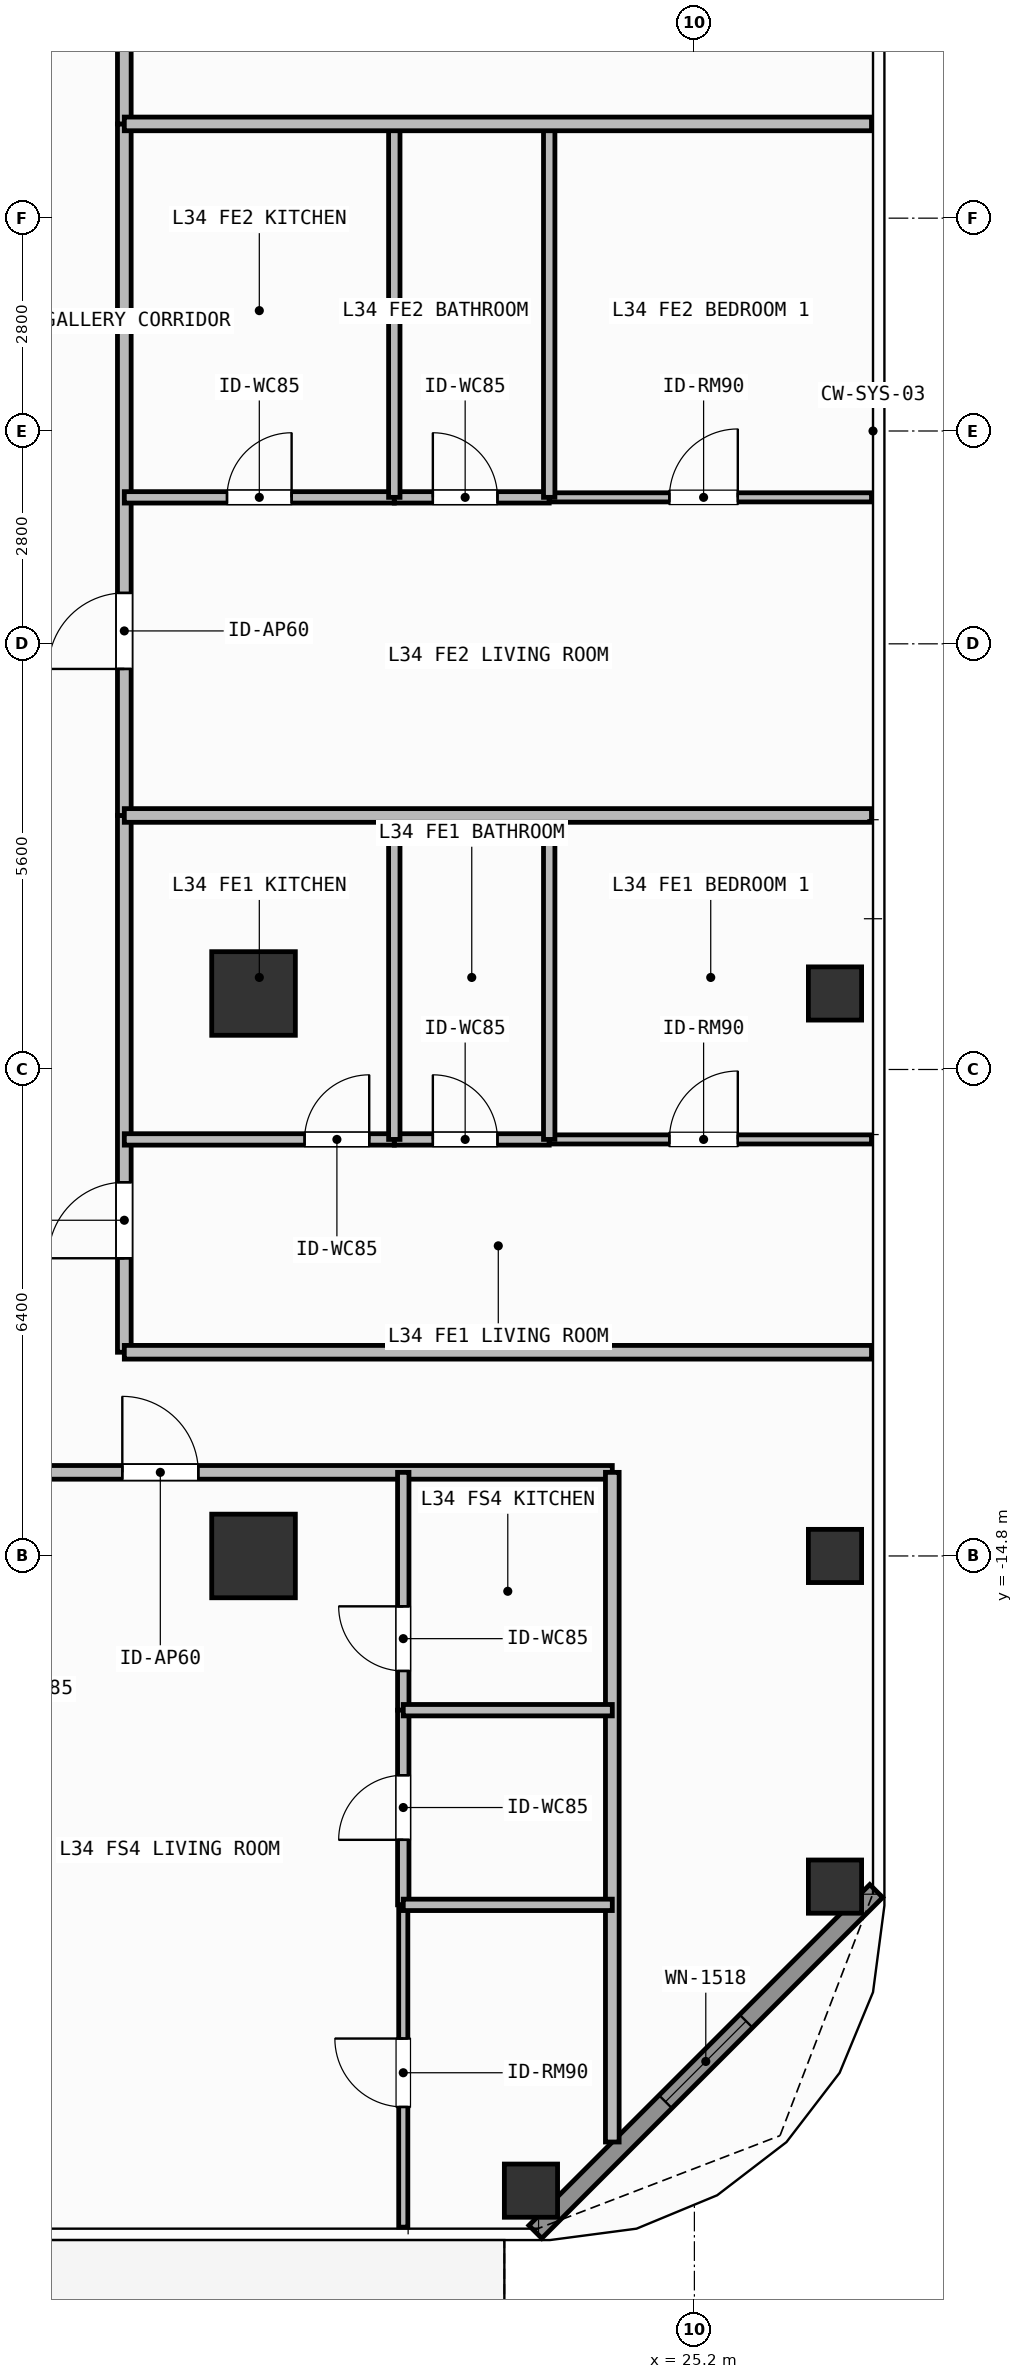
"""IFC4 building model, lengths in metres.
Left out: names, types, materials, properties, quantities, classifications, styles, units other than length and angle.
Written with IfcOpenShell. Run it as: python <this file> out.ifc"""

import sys

from ifc_helpers import new_model, si_unit, direction, frame, frame_2d, origin, origin_2d, place, context, subcontext, project, spatial, rectangle, hollow_rectangle, extrude, element, fill, save


model = new_model("IFC4")
c1 = context("Model", 3, precision=1e-05, world=origin(), true_north=direction((0.0, 1.0)))
c2 = subcontext(c1, "Body", "Model", "MODEL_VIEW")
j1 = project(units=[si_unit("LENGTHUNIT", "METRE"), si_unit("PLANEANGLEUNIT", "RADIAN")], contexts=[c1])
p1 = place(None, origin())
s1 = spatial("IfcSite", under=j1, at=p1, CompositionType="ELEMENT")
p2 = place(p1, origin())
s2 = spatial("IfcBuilding", under=s1, at=p2, CompositionType="ELEMENT")
p3 = place(p2, frame((0.0, 0.0, 136.8)))
s3 = spatial("IfcBuildingStorey", under=s2, at=p3, CompositionType="ELEMENT", Elevation=136.8)
for number, where, z_axis, x_axis in (
    (1, (19.4, -14.8, 0.0), (0.0, 0.0, 1.0), (1.0, 0.0, 0.0)),
    (2, (19.4, -7.4, 0.0), (0.0, 0.0, 1.0), (1.0, 0.0, 0.0)),
):
    element("IfcColumn", number, at=place(p3, frame(where, z_axis=z_axis, x_axis=x_axis)), inside=s3, PredefinedType="COLUMN", context=c2, shape_type="SweptSolid", body=[
        extrude(rectangle(XDim=1.1, YDim=1.1, at=origin_2d()), origin(), (0.0, 0.0, 1.0), 3.9),
    ])
for number, where, z_axis, x_axis in (
    (3, (23.05, -23.15, 0.0), (0.0, 0.0, 1.0), (1.0, 0.0, 0.0)),
    (4, (27.05, -19.15, 0.0), (0.0, 0.0, 1.0), (1.0, 0.0, 0.0)),
    (5, (27.05, -14.8, 0.0), (0.0, 0.0, 1.0), (1.0, 0.0, 0.0)),
    (6, (27.05, -7.4, 0.0), (0.0, 0.0, 1.0), (1.0, 0.0, 0.0)),
):
    element("IfcColumn", number, at=place(p3, frame(where, z_axis=z_axis, x_axis=x_axis)), inside=s3, PredefinedType="COLUMN", context=c2, shape_type="SweptSolid", body=[
        extrude(hollow_rectangle(XDim=0.7, YDim=0.7, WallThickness=0.032, at=origin_2d()), origin(), (0.0, 0.0, 1.0), 3.9),
    ])
p4 = place(p3, frame((27.592, -19.208, 0.0), z_axis=(0.0, 0.0, 1.0), x_axis=(-0.707087534163, -0.707126027686, 0.0)))
e7 = element("IfcWall", 7, at=p4, inside=s3, PredefinedType="SOLIDWALL", context=c2, shape_type="SweptSolid", body=[
    extrude(rectangle(XDim=6.342, YDim=0.24, at=frame_2d((3.171, 0.0))), origin(), (0.0, 0.0, 1.0), 3.68),
])
p5 = place(p4, frame((2.421, 0.0, 0.8)))
e8 = element("IfcOpeningElement", 8, at=p5, cuts=e7, PredefinedType="OPENING", context=c2, shape_type="SweptSolid", body=[
    extrude(rectangle(XDim=1.5, YDim=1.85, at=frame_2d((0.75, 0.925))), frame((0.0, 0.13, 0.0), z_axis=(0.0, -1.0, 0.0), x_axis=(1.0, 0.0, 0.0)), (0.0, 0.0, 1.0), 0.26),
])
p6 = place(p3, frame((15.223, -13.7, 0.0), z_axis=(0.0, 0.0, 1.0), x_axis=(1.0, 0.0, 0.0)))
e9 = element("IfcWall", 9, at=p6, inside=s3, PredefinedType="PARTITIONING", context=c2, shape_type="SweptSolid", body=[
    extrude(rectangle(XDim=8.897, YDim=0.18, at=frame_2d((4.449, 0.0))), origin(), (0.0, 0.0, 1.0), 3.68),
])
p7 = place(p6, frame((2.451, 0.0, 0.0)))
e10 = element("IfcOpeningElement", 10, at=p7, cuts=e9, PredefinedType="OPENING", context=c2, shape_type="SweptSolid", body=[
    extrude(rectangle(XDim=1.0, YDim=2.2, at=frame_2d((0.5, 1.1))), frame((0.0, 0.1, 0.0), z_axis=(0.0, -1.0, 0.0), x_axis=(1.0, 0.0, 0.0)), (0.0, 0.0, 1.0), 0.2),
])
p8 = place(p3, frame((21.37, -16.829, 0.0), z_axis=(0.0, 0.0, 1.0), x_axis=(0.0, 1.0, 0.0)))
e11 = element("IfcWall", 11, at=p8, inside=s3, PredefinedType="PARTITIONING", context=c2, shape_type="SweptSolid", body=[
    extrude(rectangle(XDim=3.129, YDim=0.15, at=frame_2d((1.564, 0.0))), origin(), (0.0, 0.0, 1.0), 3.68),
])
p9 = place(p8, frame((0.516, 0.0, 0.0)))
e12 = element("IfcOpeningElement", 12, at=p9, cuts=e11, PredefinedType="OPENING", context=c2, shape_type="SweptSolid", body=[
    extrude(rectangle(XDim=0.85, YDim=2.1, at=frame_2d((0.425, 1.05))), frame((0.0, 0.085, 0.0), z_axis=(0.0, -1.0, 0.0), x_axis=(1.0, 0.0, 0.0)), (0.0, 0.0, 1.0), 0.17),
])
p10 = place(p3, frame((21.37, -19.39, 0.0), z_axis=(0.0, 0.0, 1.0), x_axis=(0.0, 1.0, 0.0)))
e13 = element("IfcWall", 13, at=p10, inside=s3, PredefinedType="PARTITIONING", context=c2, shape_type="SweptSolid", body=[
    extrude(rectangle(XDim=2.561, YDim=0.15, at=frame_2d((1.28, 0.0))), origin(), (0.0, 0.0, 1.0), 3.68),
])
p11 = place(p10, frame((0.855, 0.0, 0.0)))
e14 = element("IfcOpeningElement", 14, at=p11, cuts=e13, PredefinedType="OPENING", context=c2, shape_type="SweptSolid", body=[
    extrude(rectangle(XDim=0.85, YDim=2.1, at=frame_2d((0.425, 1.05))), frame((0.0, 0.085, 0.0), z_axis=(0.0, -1.0, 0.0), x_axis=(1.0, 0.0, 0.0)), (0.0, 0.0, 1.0), 0.17),
])
p12 = place(p3, frame((21.37, -23.63, 0.0), z_axis=(0.0, 0.0, 1.0), x_axis=(0.0, 1.0, 0.0)))
e15 = element("IfcWall", 15, at=p12, inside=s3, PredefinedType="PARTITIONING", context=c2, shape_type="SweptSolid", body=[
    extrude(rectangle(XDim=4.24, YDim=0.12, at=frame_2d((2.12, 0.0))), origin(), (0.0, 0.0, 1.0), 3.68),
])
p13 = place(p12, frame((1.581, 0.0, 0.0)))
e16 = element("IfcOpeningElement", 16, at=p13, cuts=e15, PredefinedType="OPENING", context=c2, shape_type="SweptSolid", body=[
    extrude(rectangle(XDim=0.9, YDim=2.1, at=frame_2d((0.45, 1.05))), frame((0.0, 0.07, 0.0), z_axis=(0.0, -1.0, 0.0), x_axis=(1.0, 0.0, 0.0)), (0.0, 0.0, 1.0), 0.14),
])
p14 = place(p3, frame((17.7, -12.12, 0.0), z_axis=(0.0, 0.0, 1.0), x_axis=(0.0, 1.0, 0.0)))
e17 = element("IfcWall", 17, at=p14, inside=s3, PredefinedType="PARTITIONING", context=c2, shape_type="SweptSolid", body=[
    extrude(rectangle(XDim=7.062, YDim=0.18, at=frame_2d((3.531, 0.0))), origin(), (0.0, 0.0, 1.0), 3.68),
])
p15 = place(p14, frame((1.237, 0.0, 0.0)))
e18 = element("IfcOpeningElement", 18, at=p15, cuts=e17, PredefinedType="OPENING", context=c2, shape_type="SweptSolid", body=[
    extrude(rectangle(XDim=1.0, YDim=2.2, at=frame_2d((0.5, 1.1))), frame((0.0, 0.1, 0.0), z_axis=(0.0, -1.0, 0.0), x_axis=(1.0, 0.0, 0.0)), (0.0, 0.0, 1.0), 0.2),
])
p16 = place(p3, frame((17.7, -9.32, 0.0), z_axis=(0.0, 0.0, 1.0), x_axis=(1.0, 0.0, 0.0)))
e19 = element("IfcWall", 19, at=p16, inside=s3, PredefinedType="PARTITIONING", context=c2, shape_type="SweptSolid", body=[
    extrude(rectangle(XDim=3.552, YDim=0.15, at=frame_2d((1.776, 0.0))), origin(), (0.0, 0.0, 1.0), 3.68),
])
p17 = place(p16, frame((2.372, 0.0, 0.0)))
e20 = element("IfcOpeningElement", 20, at=p17, cuts=e19, PredefinedType="OPENING", context=c2, shape_type="SweptSolid", body=[
    extrude(rectangle(XDim=0.85, YDim=2.1, at=frame_2d((0.425, 1.05))), frame((0.0, 0.085, 0.0), z_axis=(0.0, -1.0, 0.0), x_axis=(1.0, 0.0, 0.0)), (0.0, 0.0, 1.0), 0.17),
])
p18 = place(p3, frame((21.252, -9.32, 0.0), z_axis=(0.0, 0.0, 1.0), x_axis=(1.0, 0.0, 0.0)))
e21 = element("IfcWall", 21, at=p18, inside=s3, PredefinedType="PARTITIONING", context=c2, shape_type="SweptSolid", body=[
    extrude(rectangle(XDim=2.038, YDim=0.15, at=frame_2d((1.019, 0.0))), origin(), (0.0, 0.0, 1.0), 3.68),
])
p19 = place(p18, frame((0.507, 0.0, 0.0)))
e22 = element("IfcOpeningElement", 22, at=p19, cuts=e21, PredefinedType="OPENING", context=c2, shape_type="SweptSolid", body=[
    extrude(rectangle(XDim=0.85, YDim=2.1, at=frame_2d((0.425, 1.05))), frame((0.0, 0.085, 0.0), z_axis=(0.0, -1.0, 0.0), x_axis=(1.0, 0.0, 0.0)), (0.0, 0.0, 1.0), 0.17),
])
p20 = place(p3, frame((23.29, -9.32, 0.0), z_axis=(0.0, 0.0, 1.0), x_axis=(1.0, 0.0, 0.0)))
e23 = element("IfcWall", 23, at=p20, inside=s3, PredefinedType="PARTITIONING", context=c2, shape_type="SweptSolid", body=[
    extrude(rectangle(XDim=4.24, YDim=0.12, at=frame_2d((2.12, 0.0))), origin(), (0.0, 0.0, 1.0), 3.68),
])
p21 = place(p20, frame((1.581, 0.0, 0.0)))
e24 = element("IfcOpeningElement", 24, at=p21, cuts=e23, PredefinedType="OPENING", context=c2, shape_type="SweptSolid", body=[
    extrude(rectangle(XDim=0.9, YDim=2.1, at=frame_2d((0.45, 1.05))), frame((0.0, 0.07, 0.0), z_axis=(0.0, -1.0, 0.0), x_axis=(1.0, 0.0, 0.0)), (0.0, 0.0, 1.0), 0.14),
])
p22 = place(p3, frame((17.7, -5.058, 0.0), z_axis=(0.0, 0.0, 1.0), x_axis=(0.0, 1.0, 0.0)))
e25 = element("IfcWall", 25, at=p22, inside=s3, PredefinedType="PARTITIONING", context=c2, shape_type="SweptSolid", body=[
    extrude(rectangle(XDim=9.098, YDim=0.18, at=frame_2d((4.549, 0.0))), origin(), (0.0, 0.0, 1.0), 3.68),
])
p23 = place(p22, frame((1.928, 0.0, 0.0)))
e26 = element("IfcOpeningElement", 26, at=p23, cuts=e25, PredefinedType="OPENING", context=c2, shape_type="SweptSolid", body=[
    extrude(rectangle(XDim=1.0, YDim=2.2, at=frame_2d((0.5, 1.1))), frame((0.0, 0.1, 0.0), z_axis=(0.0, -1.0, 0.0), x_axis=(1.0, 0.0, 0.0)), (0.0, 0.0, 1.0), 0.2),
])
p24 = place(p3, frame((17.7, -0.873, 0.0), z_axis=(0.0, 0.0, 1.0), x_axis=(1.0, 0.0, 0.0)))
e27 = element("IfcWall", 27, at=p24, inside=s3, PredefinedType="PARTITIONING", context=c2, shape_type="SweptSolid", body=[
    extrude(rectangle(XDim=3.552, YDim=0.15, at=frame_2d((1.776, 0.0))), origin(), (0.0, 0.0, 1.0), 3.68),
])
p25 = place(p24, frame((1.351, 0.0, 0.0)))
e28 = element("IfcOpeningElement", 28, at=p25, cuts=e27, PredefinedType="OPENING", context=c2, shape_type="SweptSolid", body=[
    extrude(rectangle(XDim=0.85, YDim=2.1, at=frame_2d((0.425, 1.05))), frame((0.0, 0.085, 0.0), z_axis=(0.0, -1.0, 0.0), x_axis=(1.0, 0.0, 0.0)), (0.0, 0.0, 1.0), 0.17),
])
p26 = place(p3, frame((21.252, -0.873, 0.0), z_axis=(0.0, 0.0, 1.0), x_axis=(1.0, 0.0, 0.0)))
e29 = element("IfcWall", 29, at=p26, inside=s3, PredefinedType="PARTITIONING", context=c2, shape_type="SweptSolid", body=[
    extrude(rectangle(XDim=2.038, YDim=0.15, at=frame_2d((1.019, 0.0))), origin(), (0.0, 0.0, 1.0), 3.68),
])
p27 = place(p26, frame((0.507, 0.0, 0.0)))
e30 = element("IfcOpeningElement", 30, at=p27, cuts=e29, PredefinedType="OPENING", context=c2, shape_type="SweptSolid", body=[
    extrude(rectangle(XDim=0.85, YDim=2.1, at=frame_2d((0.425, 1.05))), frame((0.0, 0.085, 0.0), z_axis=(0.0, -1.0, 0.0), x_axis=(1.0, 0.0, 0.0)), (0.0, 0.0, 1.0), 0.17),
])
p28 = place(p3, frame((23.29, -0.873, 0.0), z_axis=(0.0, 0.0, 1.0), x_axis=(1.0, 0.0, 0.0)))
e31 = element("IfcWall", 31, at=p28, inside=s3, PredefinedType="PARTITIONING", context=c2, shape_type="SweptSolid", body=[
    extrude(rectangle(XDim=4.24, YDim=0.12, at=frame_2d((2.12, 0.0))), origin(), (0.0, 0.0, 1.0), 3.68),
])
p29 = place(p28, frame((1.581, 0.0, 0.0)))
e32 = element("IfcOpeningElement", 32, at=p29, cuts=e31, PredefinedType="OPENING", context=c2, shape_type="SweptSolid", body=[
    extrude(rectangle(XDim=0.9, YDim=2.1, at=frame_2d((0.45, 1.05))), frame((0.0, 0.07, 0.0), z_axis=(0.0, -1.0, 0.0), x_axis=(1.0, 0.0, 0.0)), (0.0, 0.0, 1.0), 0.14),
])
p30 = place(p3, frame((17.7, 4.04, 0.0), z_axis=(0.0, 0.0, 1.0), x_axis=(0.0, 1.0, 0.0)))
e33 = element("IfcWall", 33, at=p30, inside=s3, PredefinedType="PARTITIONING", context=c2, shape_type="SweptSolid", body=[
    extrude(rectangle(XDim=8.08, YDim=0.18, at=frame_2d((4.04, 0.0))), origin(), (0.0, 0.0, 1.0), 3.68),
])
p31 = place(p30, frame((1.761, 0.0, 0.0)))
e34 = element("IfcOpeningElement", 34, at=p31, cuts=e33, PredefinedType="OPENING", context=c2, shape_type="SweptSolid", body=[
    extrude(rectangle(XDim=1.0, YDim=2.2, at=frame_2d((0.5, 1.1))), frame((0.0, 0.1, 0.0), z_axis=(0.0, -1.0, 0.0), x_axis=(1.0, 0.0, 0.0)), (0.0, 0.0, 1.0), 0.2),
])
p32 = place(p3, frame((24.12, -22.51, 0.0), z_axis=(0.0, 0.0, 1.0), x_axis=(0.0, 1.0, 0.0)))
e35 = element("IfcWall", 35, at=p32, inside=s3, PredefinedType="PARTITIONING", context=c2, shape_type="SweptSolid", body=[
    extrude(rectangle(XDim=8.81, YDim=0.18, at=frame_2d((4.405, 0.0))), origin(), (0.0, 0.0, 1.0), 3.68),
])
for number, where, z_axis, x_axis in (
    (36, (21.37, -16.829, 0.0), (0.0, 0.0, 1.0), (1.0, 0.0, 0.0)),
    (37, (21.37, -19.39, 0.0), (0.0, 0.0, 1.0), (1.0, 0.0, 0.0)),
):
    element("IfcWall", number, at=place(p3, frame(where, z_axis=z_axis, x_axis=x_axis)), inside=s3, PredefinedType="PARTITIONING", context=c2, shape_type="SweptSolid", body=[
        extrude(rectangle(XDim=2.75, YDim=0.15, at=frame_2d((1.375, 0.0))), origin(), (0.0, 0.0, 1.0), 3.68),
    ])
for number, where, z_axis, x_axis in (
    (38, (21.252, -9.32, 0.0), (0.0, 0.0, 1.0), (0.0, 1.0, 0.0)),
    (39, (23.29, -9.32, 0.0), (0.0, 0.0, 1.0), (0.0, 1.0, 0.0)),
):
    element("IfcWall", number, at=place(p3, frame(where, z_axis=z_axis, x_axis=x_axis)), inside=s3, PredefinedType="PARTITIONING", context=c2, shape_type="SweptSolid", body=[
        extrude(rectangle(XDim=4.262, YDim=0.15, at=frame_2d((2.131, 0.0))), origin(), (0.0, 0.0, 1.0), 3.68),
    ])
for number, where, z_axis, x_axis in (
    (40, (21.252, -0.873, 0.0), (0.0, 0.0, 1.0), (0.0, 1.0, 0.0)),
    (41, (23.29, -0.873, 0.0), (0.0, 0.0, 1.0), (0.0, 1.0, 0.0)),
):
    element("IfcWall", number, at=place(p3, frame(where, z_axis=z_axis, x_axis=x_axis)), inside=s3, PredefinedType="PARTITIONING", context=c2, shape_type="SweptSolid", body=[
        extrude(rectangle(XDim=4.913, YDim=0.15, at=frame_2d((2.457, 0.0))), origin(), (0.0, 0.0, 1.0), 3.68),
    ])
for number, where, z_axis, x_axis in (
    (42, (17.7, -5.058, 0.0), (0.0, 0.0, 1.0), (1.0, 0.0, 0.0)),
    (43, (17.7, 4.04, 0.0), (0.0, 0.0, 1.0), (1.0, 0.0, 0.0)),
    (44, (17.7, -12.12, 0.0), (0.0, 0.0, 1.0), (1.0, 0.0, 0.0)),
):
    element("IfcWall", number, at=place(p3, frame(where, z_axis=z_axis, x_axis=x_axis)), inside=s3, PredefinedType="PARTITIONING", context=c2, shape_type="SweptSolid", body=[
        extrude(rectangle(XDim=9.83, YDim=0.18, at=frame_2d((4.915, 0.0))), origin(), (0.0, 0.0, 1.0), 3.68),
    ])
p33 = place(p5, origin())
e45 = element("IfcWindow", 45, at=p33, inside=s3, PartitioningType="SINGLE_PANEL", PredefinedType="WINDOW", context=c2, shape_type="SweptSolid", body=[
    extrude(rectangle(XDim=1.5, YDim=1.85, at=frame_2d((0.75, 0.925))), frame((0.0, 0.03, 0.0), z_axis=(0.0, -1.0, 0.0), x_axis=(1.0, 0.0, 0.0)), (0.0, 0.0, 1.0), 0.06),
])
fill(e8, e45)
p34 = place(p7, origin())
e46 = element("IfcDoor", 46, at=p34, inside=s3, OperationType="SINGLE_SWING_LEFT", PredefinedType="DOOR", context=c2, shape_type="SweptSolid", body=[
    extrude(rectangle(XDim=1.0, YDim=2.2, at=frame_2d((0.5, 1.1))), frame((0.0, 0.025, 0.0), z_axis=(0.0, -1.0, 0.0), x_axis=(1.0, 0.0, 0.0)), (0.0, 0.0, 1.0), 0.05),
])
fill(e10, e46)
p35 = place(p9, origin())
e47 = element("IfcDoor", 47, at=p35, inside=s3, OperationType="SINGLE_SWING_RIGHT", PredefinedType="DOOR", context=c2, shape_type="SweptSolid", body=[
    extrude(rectangle(XDim=0.85, YDim=2.1, at=frame_2d((0.425, 1.05))), frame((0.0, 0.025, 0.0), z_axis=(0.0, -1.0, 0.0), x_axis=(1.0, 0.0, 0.0)), (0.0, 0.0, 1.0), 0.05),
])
fill(e12, e47)
p36 = place(p11, origin())
e48 = element("IfcDoor", 48, at=p36, inside=s3, OperationType="SINGLE_SWING_LEFT", PredefinedType="DOOR", context=c2, shape_type="SweptSolid", body=[
    extrude(rectangle(XDim=0.85, YDim=2.1, at=frame_2d((0.425, 1.05))), frame((0.0, 0.025, 0.0), z_axis=(0.0, -1.0, 0.0), x_axis=(1.0, 0.0, 0.0)), (0.0, 0.0, 1.0), 0.05),
])
fill(e14, e48)
p37 = place(p13, origin())
e49 = element("IfcDoor", 49, at=p37, inside=s3, OperationType="SINGLE_SWING_RIGHT", PredefinedType="DOOR", context=c2, shape_type="SweptSolid", body=[
    extrude(rectangle(XDim=0.9, YDim=2.1, at=frame_2d((0.45, 1.05))), frame((0.0, 0.025, 0.0), z_axis=(0.0, -1.0, 0.0), x_axis=(1.0, 0.0, 0.0)), (0.0, 0.0, 1.0), 0.05),
])
fill(e16, e49)
p38 = place(p15, origin())
e50 = element("IfcDoor", 50, at=p38, inside=s3, OperationType="SINGLE_SWING_LEFT", PredefinedType="DOOR", context=c2, shape_type="SweptSolid", body=[
    extrude(rectangle(XDim=1.0, YDim=2.2, at=frame_2d((0.5, 1.1))), frame((0.0, 0.025, 0.0), z_axis=(0.0, -1.0, 0.0), x_axis=(1.0, 0.0, 0.0)), (0.0, 0.0, 1.0), 0.05),
])
fill(e18, e50)
p39 = place(p17, origin())
e51 = element("IfcDoor", 51, at=p39, inside=s3, OperationType="SINGLE_SWING_RIGHT", PredefinedType="DOOR", context=c2, shape_type="SweptSolid", body=[
    extrude(rectangle(XDim=0.85, YDim=2.1, at=frame_2d((0.425, 1.05))), frame((0.0, 0.025, 0.0), z_axis=(0.0, -1.0, 0.0), x_axis=(1.0, 0.0, 0.0)), (0.0, 0.0, 1.0), 0.05),
])
fill(e20, e51)
p40 = place(p19, origin())
e52 = element("IfcDoor", 52, at=p40, inside=s3, OperationType="SINGLE_SWING_LEFT", PredefinedType="DOOR", context=c2, shape_type="SweptSolid", body=[
    extrude(rectangle(XDim=0.85, YDim=2.1, at=frame_2d((0.425, 1.05))), frame((0.0, 0.025, 0.0), z_axis=(0.0, -1.0, 0.0), x_axis=(1.0, 0.0, 0.0)), (0.0, 0.0, 1.0), 0.05),
])
fill(e22, e52)
p41 = place(p21, origin())
e53 = element("IfcDoor", 53, at=p41, inside=s3, OperationType="SINGLE_SWING_RIGHT", PredefinedType="DOOR", context=c2, shape_type="SweptSolid", body=[
    extrude(rectangle(XDim=0.9, YDim=2.1, at=frame_2d((0.45, 1.05))), frame((0.0, 0.025, 0.0), z_axis=(0.0, -1.0, 0.0), x_axis=(1.0, 0.0, 0.0)), (0.0, 0.0, 1.0), 0.05),
])
fill(e24, e53)
p42 = place(p23, origin())
e54 = element("IfcDoor", 54, at=p42, inside=s3, OperationType="SINGLE_SWING_LEFT", PredefinedType="DOOR", context=c2, shape_type="SweptSolid", body=[
    extrude(rectangle(XDim=1.0, YDim=2.2, at=frame_2d((0.5, 1.1))), frame((0.0, 0.025, 0.0), z_axis=(0.0, -1.0, 0.0), x_axis=(1.0, 0.0, 0.0)), (0.0, 0.0, 1.0), 0.05),
])
fill(e26, e54)
p43 = place(p25, origin())
e55 = element("IfcDoor", 55, at=p43, inside=s3, OperationType="SINGLE_SWING_RIGHT", PredefinedType="DOOR", context=c2, shape_type="SweptSolid", body=[
    extrude(rectangle(XDim=0.85, YDim=2.1, at=frame_2d((0.425, 1.05))), frame((0.0, 0.025, 0.0), z_axis=(0.0, -1.0, 0.0), x_axis=(1.0, 0.0, 0.0)), (0.0, 0.0, 1.0), 0.05),
])
fill(e28, e55)
p44 = place(p27, origin())
e56 = element("IfcDoor", 56, at=p44, inside=s3, OperationType="SINGLE_SWING_LEFT", PredefinedType="DOOR", context=c2, shape_type="SweptSolid", body=[
    extrude(rectangle(XDim=0.85, YDim=2.1, at=frame_2d((0.425, 1.05))), frame((0.0, 0.025, 0.0), z_axis=(0.0, -1.0, 0.0), x_axis=(1.0, 0.0, 0.0)), (0.0, 0.0, 1.0), 0.05),
])
fill(e30, e56)
p45 = place(p29, origin())
e57 = element("IfcDoor", 57, at=p45, inside=s3, OperationType="SINGLE_SWING_RIGHT", PredefinedType="DOOR", context=c2, shape_type="SweptSolid", body=[
    extrude(rectangle(XDim=0.9, YDim=2.1, at=frame_2d((0.45, 1.05))), frame((0.0, 0.025, 0.0), z_axis=(0.0, -1.0, 0.0), x_axis=(1.0, 0.0, 0.0)), (0.0, 0.0, 1.0), 0.05),
])
fill(e32, e57)
save(model, sys.argv[1])
